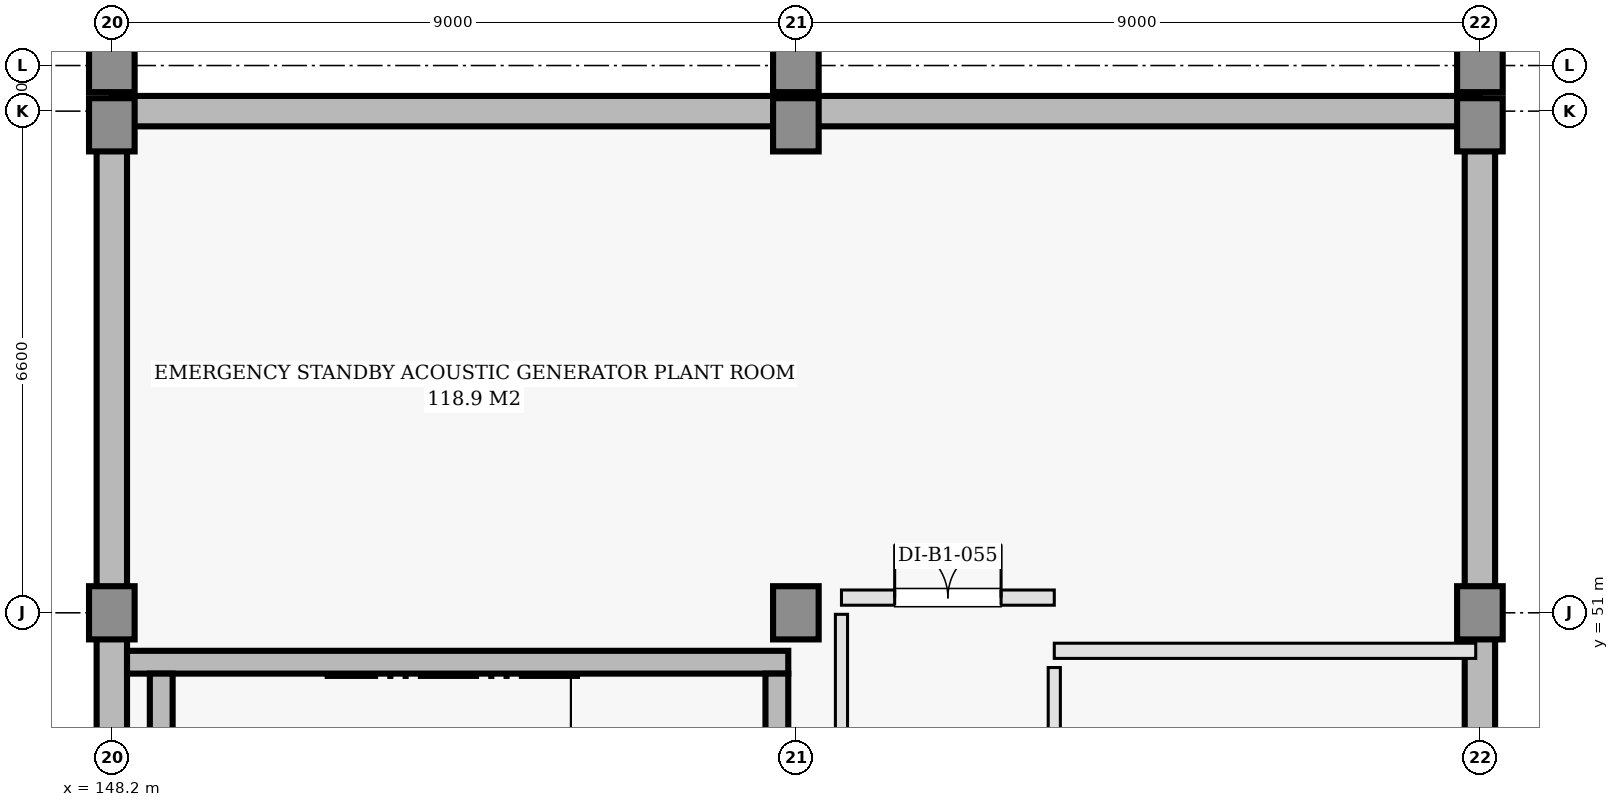
"""IFC4 building model, lengths in metres.
Left out: names, types, materials, properties, quantities, classifications, styles, units other than length and angle.
Written with IfcOpenShell. Run it as: python <this file> out.ifc"""

import sys

from ifc_helpers import new_model, si_unit, direction, frame, frame_2d, origin, origin_2d, place, context, subcontext, project, spatial, rectangle, extrude, element, fill, save


model = new_model("IFC4")
c1 = context("Model", 3, precision=1e-05, world=origin(), true_north=direction((0.0, 1.0)))
c2 = subcontext(c1, "Body", "Model", "MODEL_VIEW")
j1 = project(units=[si_unit("LENGTHUNIT", "METRE"), si_unit("PLANEANGLEUNIT", "RADIAN")], contexts=[c1])
p1 = place(None, origin())
s1 = spatial("IfcSite", under=j1, at=p1, CompositionType="ELEMENT")
p2 = place(p1, origin())
s2 = spatial("IfcBuilding", under=s1, at=p2, CompositionType="ELEMENT")
p3 = place(p2, frame((0.0, 0.0, -4.5)))
s3 = spatial("IfcBuildingStorey", under=s2, at=p3, CompositionType="ELEMENT", Elevation=-4.5)
for number, where, z_axis, x_axis in (
    (1, (148.2, 51.0, 0.0), (0.0, 0.0, 1.0), (1.0, 0.0, 0.0)),
    (2, (148.2, 57.42, 0.0), (0.0, 0.0, 1.0), (1.0, 0.0, 0.0)),
    (3, (157.2, 51.0, 0.0), (0.0, 0.0, 1.0), (1.0, 0.0, 0.0)),
    (4, (157.2, 57.42, 0.0), (0.0, 0.0, 1.0), (1.0, 0.0, 0.0)),
    (5, (166.2, 51.0, 0.0), (0.0, 0.0, 1.0), (1.0, 0.0, 0.0)),
    (6, (166.2, 57.42, 0.0), (0.0, 0.0, 1.0), (1.0, 0.0, 0.0)),
):
    element("IfcColumn", number, at=place(p3, frame(where, z_axis=z_axis, x_axis=x_axis)), inside=s3, PredefinedType="COLUMN", context=c2, shape_type="SweptSolid", body=[
        extrude(rectangle(XDim=0.7, YDim=0.7, at=origin_2d()), origin(), (0.0, 0.0, 1.0), 4.5),
    ])
for number, where, z_axis, x_axis in (
    (7, (148.2, 58.2, 0.0), (0.0, 0.0, 1.0), (1.0, 0.0, 0.0)),
    (8, (157.2, 58.2, 0.0), (0.0, 0.0, 1.0), (1.0, 0.0, 0.0)),
    (9, (166.2, 58.2, 0.0), (0.0, 0.0, 1.0), (1.0, 0.0, 0.0)),
):
    element("IfcColumn", number, at=place(p3, frame(where, z_axis=z_axis, x_axis=x_axis)), inside=s3, PredefinedType="PILASTER", context=c2, shape_type="SweptSolid", body=[
        extrude(rectangle(XDim=0.7, YDim=0.7, at=origin_2d()), origin(), (0.0, 0.0, 1.0), 4.5),
    ])
p4 = place(p3, frame((166.2, 36.0, 0.0), z_axis=(0.0, 0.0, 1.0), x_axis=(0.0, 1.0, 0.0)))
e10 = element("IfcWall", 10, at=p4, inside=s3, PredefinedType="USERDEFINED", context=c2, shape_type="SweptSolid", body=[
    extrude(rectangle(XDim=21.6, YDim=0.4, at=frame_2d((10.8, 0.0))), origin(), (0.0, 0.0, 1.0), 4.15),
])
p5 = place(p3, frame((166.2, 57.6, 0.0), z_axis=(0.0, 0.0, 1.0), x_axis=(-1.0, 0.0, 0.0)))
e11 = element("IfcWall", 11, at=p5, inside=s3, PredefinedType="USERDEFINED", context=c2, shape_type="SweptSolid", body=[
    extrude(rectangle(XDim=18.0, YDim=0.4, at=frame_2d((9.0, 0.0))), origin(), (0.0, 0.0, 1.0), 4.15),
])
p6 = place(p3, frame((148.2, 57.6, 0.0), z_axis=(0.0, 0.0, 1.0), x_axis=(0.0, -1.0, 0.0)))
e12 = element("IfcWall", 12, at=p6, inside=s3, PredefinedType="USERDEFINED", context=c2, shape_type="SweptSolid", body=[
    extrude(rectangle(XDim=28.8, YDim=0.4, at=frame_2d((14.4, 0.0))), origin(), (0.0, 0.0, 1.0), 4.15),
])
p7 = place(p3, frame((148.4, 50.35, 0.0), z_axis=(0.0, 0.0, 1.0), x_axis=(1.0, 0.0, 0.0)))
e13 = element("IfcWall", 13, at=p7, inside=s3, PredefinedType="SHEAR", context=c2, shape_type="SweptSolid", body=[
    extrude(rectangle(XDim=8.7, YDim=0.3, at=frame_2d((4.35, 0.0))), origin(), (0.0, 0.0, 1.0), 4.15),
])
for number, where, z_axis, x_axis in (
    (14, (148.85, 46.1, 0.0), (0.0, 0.0, 1.0), (0.0, 1.0, 0.0)),
    (15, (156.95, 46.1, 0.0), (0.0, 0.0, 1.0), (0.0, 1.0, 0.0)),
):
    element("IfcWall", number, at=place(p3, frame(where, z_axis=z_axis, x_axis=x_axis)), inside=s3, PredefinedType="SHEAR", context=c2, shape_type="SweptSolid", body=[
        extrude(rectangle(XDim=4.1, YDim=0.3, at=frame_2d((2.05, 0.0))), origin(), (0.0, 0.0, 1.0), 4.15),
    ])
p8 = place(p3, frame((157.8, 51.2, 0.0), z_axis=(0.0, 0.0, 1.0), x_axis=(1.0, 0.0, 0.0)))
e16 = element("IfcWall", 16, at=p8, inside=s3, PredefinedType="PARTITIONING", context=c2, shape_type="SweptSolid", body=[
    extrude(rectangle(XDim=2.8, YDim=0.2, at=frame_2d((1.4, 0.0))), origin(), (0.0, 0.0, 1.0), 3.335),
])
p9 = place(p8, frame((0.7, 0.0, 0.0)))
e17 = element("IfcOpeningElement", 17, at=p9, cuts=e16, PredefinedType="OPENING", context=c2, shape_type="SweptSolid", body=[
    extrude(rectangle(XDim=1.4, YDim=2.15, at=frame_2d((0.7, 1.075))), frame((0.0, 0.11, 0.0), z_axis=(0.0, -1.0, 0.0), x_axis=(1.0, 0.0, 0.0)), (0.0, 0.0, 1.0), 0.22),
])
p10 = place(p3, frame((160.6, 50.5, 0.0), z_axis=(0.0, 0.0, 1.0), x_axis=(1.0, 0.0, 0.0)))
e18 = element("IfcWall", 18, at=p10, inside=s3, PredefinedType="PARTITIONING", context=c2, shape_type="SweptSolid", body=[
    extrude(rectangle(XDim=5.545, YDim=0.2, at=frame_2d((2.772, 0.0))), origin(), (0.0, 0.0, 1.0), 3.485),
])
p11 = place(p3, frame((157.8, 43.22, 0.0), z_axis=(0.0, 0.0, 1.0), x_axis=(0.0, 1.0, 0.0)))
e19 = element("IfcWall", 19, at=p11, inside=s3, PredefinedType="PARTITIONING", context=c2, shape_type="SweptSolid", body=[
    extrude(rectangle(XDim=7.76, YDim=0.16, at=frame_2d((3.88, 0.0))), origin(), (0.0, 0.0, 1.0), 3.335),
])
p12 = place(p3, frame((160.6, 46.02, 0.0), z_axis=(0.0, 0.0, 1.0), x_axis=(0.0, 1.0, 0.0)))
e20 = element("IfcWall", 20, at=p12, inside=s3, PredefinedType="PARTITIONING", context=c2, shape_type="SweptSolid", body=[
    extrude(rectangle(XDim=4.26, YDim=0.16, at=frame_2d((2.13, 0.0))), origin(), (0.0, 0.0, 1.0), 4.15),
])
p13 = place(p9, origin())
e21 = element("IfcDoor", 21, at=p13, inside=s3, OperationType="DOUBLE_DOOR_SINGLE_SWING", PredefinedType="DOOR", context=c2, shape_type="SweptSolid", body=[
    extrude(rectangle(XDim=1.4, YDim=2.15, at=frame_2d((0.7, 1.075))), frame((0.0, 0.025, 0.0), z_axis=(0.0, -1.0, 0.0), x_axis=(1.0, 0.0, 0.0)), (0.0, 0.0, 1.0), 0.05),
])
fill(e17, e21)
save(model, sys.argv[1])
